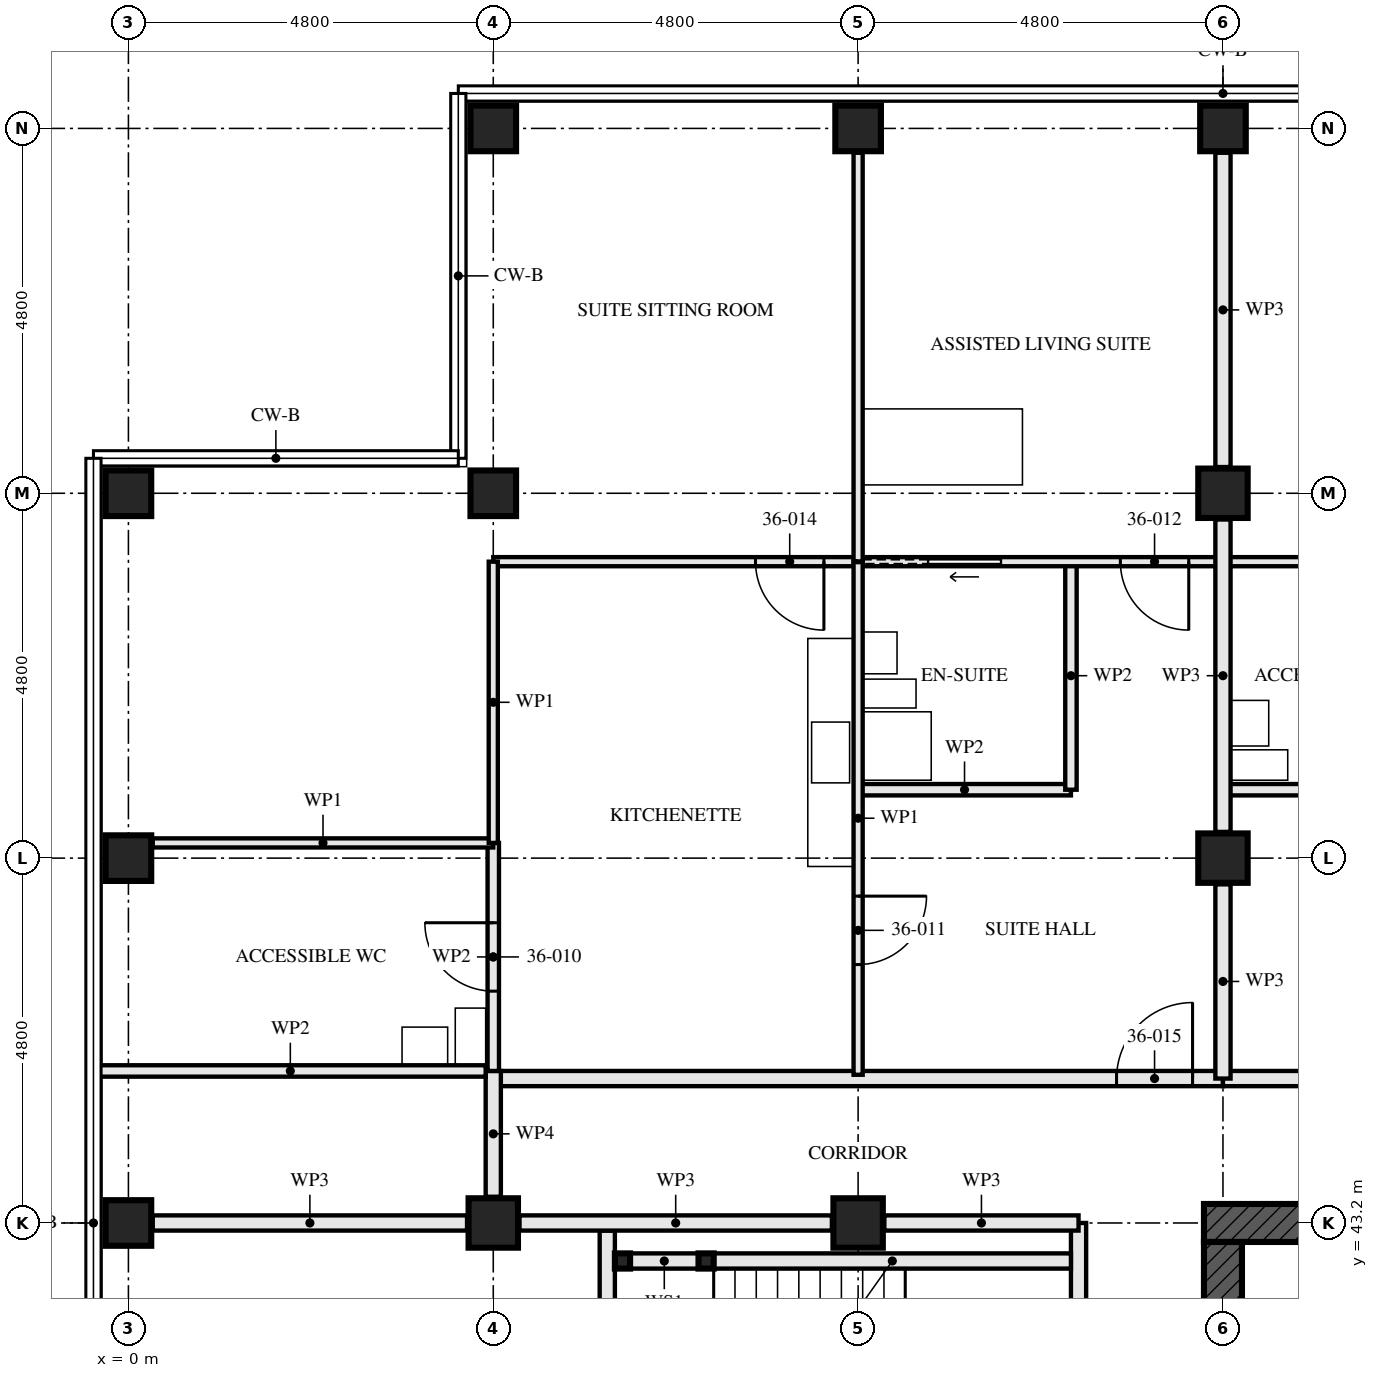
"""IFC4 building model, lengths in metres.
Left out: names, types, materials, properties, quantities, classifications, styles, units other than length and angle.
Written with IfcOpenShell. Run it as: python <this file> out.ifc"""

import sys

from ifc_helpers import new_model, si_unit, direction, frame, frame_2d, origin, origin_2d, place, context, subcontext, project, spatial, rectangle, hollow_rectangle, extrude, element, fill, save


model = new_model("IFC4")
c1 = context("Model", 3, precision=1e-05, world=origin(), true_north=direction((0.0, 1.0)))
c2 = subcontext(c1, "Body", "Model", "MODEL_VIEW")
j1 = project(units=[si_unit("LENGTHUNIT", "METRE"), si_unit("PLANEANGLEUNIT", "RADIAN")], contexts=[c1])
p1 = place(None, origin())
s1 = spatial("IfcSite", under=j1, at=p1, CompositionType="ELEMENT")
p2 = place(p1, origin())
s2 = spatial("IfcBuilding", under=s1, at=p2, CompositionType="ELEMENT")
p3 = place(p2, frame((0.0, 0.0, 133.0)))
s3 = spatial("IfcBuildingStorey", under=s2, at=p3, CompositionType="ELEMENT", Elevation=133.0)
for number, where, z_axis, x_axis in (
    (1, (0.0, 43.2, 0.0), (0.0, 0.0, 1.0), (0.0, 1.0, 0.0)),
    (2, (0.0, 48.0, 0.0), (0.0, 0.0, 1.0), (1.0, 0.0, 0.0)),
    (3, (0.0, 52.8, 0.0), (0.0, 0.0, 1.0), (0.0, 1.0, 0.0)),
):
    element("IfcColumn", number, at=place(p3, frame(where, z_axis=z_axis, x_axis=x_axis)), inside=s3, PredefinedType="COLUMN", context=c2, shape_type="SweptSolid", body=[
        extrude(hollow_rectangle(XDim=0.6, YDim=0.6, WallThickness=0.08, at=origin_2d()), origin(), (0.0, 0.0, 1.0), 3.5),
    ])
p4 = place(p3, frame((4.8, 43.2, 0.0), z_axis=(0.0, 0.0, 1.0), x_axis=(0.0, 1.0, 0.0)))
e4 = element("IfcColumn", 4, at=p4, inside=s3, PredefinedType="COLUMN", context=c2, shape_type="SweptSolid", body=[
    extrude(hollow_rectangle(XDim=0.65, YDim=0.65, WallThickness=0.05, at=origin_2d()), origin(), (0.0, 0.0, 1.0), 3.5),
])
for number, where, z_axis, x_axis in (
    (5, (4.8, 52.8, 0.0), (0.0, 0.0, 1.0), (0.0, 1.0, 0.0)),
    (6, (4.8, 57.6, 0.0), (0.0, 0.0, 1.0), (0.0, 1.0, 0.0)),
):
    element("IfcColumn", number, at=place(p3, frame(where, z_axis=z_axis, x_axis=x_axis)), inside=s3, PredefinedType="COLUMN", context=c2, shape_type="SweptSolid", body=[
        extrude(hollow_rectangle(XDim=0.6, YDim=0.6, WallThickness=0.08, at=origin_2d()), origin(), (0.0, 0.0, 1.0), 3.5),
    ])
p5 = place(p3, frame((9.6, 43.2, 0.0), z_axis=(0.0, 0.0, 1.0), x_axis=(0.0, 1.0, 0.0)))
e7 = element("IfcColumn", 7, at=p5, inside=s3, PredefinedType="COLUMN", context=c2, shape_type="SweptSolid", body=[
    extrude(hollow_rectangle(XDim=0.65, YDim=0.65, WallThickness=0.05, at=origin_2d()), origin(), (0.0, 0.0, 1.0), 3.5),
])
p6 = place(p3, frame((9.6, 57.6, 0.0), z_axis=(0.0, 0.0, 1.0), x_axis=(0.0, 1.0, 0.0)))
e8 = element("IfcColumn", 8, at=p6, inside=s3, PredefinedType="COLUMN", context=c2, shape_type="SweptSolid", body=[
    extrude(hollow_rectangle(XDim=0.6, YDim=0.6, WallThickness=0.08, at=origin_2d()), origin(), (0.0, 0.0, 1.0), 3.5),
])
for number, where, z_axis, x_axis in (
    (9, (14.4, 48.0, 0.0), (0.0, 0.0, 1.0), (1.0, 0.0, 0.0)),
    (10, (14.4, 52.8, 0.0), (0.0, 0.0, 1.0), (1.0, 0.0, 0.0)),
):
    element("IfcColumn", number, at=place(p3, frame(where, z_axis=z_axis, x_axis=x_axis)), inside=s3, PredefinedType="COLUMN", context=c2, shape_type="SweptSolid", body=[
        extrude(hollow_rectangle(XDim=0.65, YDim=0.65, WallThickness=0.05, at=origin_2d()), origin(), (0.0, 0.0, 1.0), 3.5),
    ])
p7 = place(p3, frame((14.4, 57.6, 0.0), z_axis=(0.0, 0.0, 1.0), x_axis=(0.0, 1.0, 0.0)))
e11 = element("IfcColumn", 11, at=p7, inside=s3, PredefinedType="COLUMN", context=c2, shape_type="SweptSolid", body=[
    extrude(hollow_rectangle(XDim=0.6, YDim=0.6, WallThickness=0.08, at=origin_2d()), origin(), (0.0, 0.0, 1.0), 3.5),
])
p8 = place(p3, frame((29.05, 43.2, -0.17), z_axis=(0.0, 0.0, 1.0), x_axis=(-1.0, 0.0, 0.0)))
e12 = element("IfcWall", 12, at=p8, inside=s3, PredefinedType="SHEAR", context=c2, shape_type="SweptSolid", body=[
    extrude(rectangle(XDim=14.9, YDim=0.5, at=frame_2d((7.45, 0.0))), origin(), (0.0, 0.0, 1.0), 3.42),
])
p9 = place(p8, frame((6.85, 0.0, 0.17)))
e13 = element("IfcOpeningElement", 13, at=p9, cuts=e12, PredefinedType="OPENING", context=c2, shape_type="SweptSolid", body=[
    extrude(rectangle(XDim=1.2, YDim=2.1, at=frame_2d((0.6, 1.05))), frame((0.0, 0.26, 0.0), z_axis=(0.0, -1.0, 0.0), x_axis=(1.0, 0.0, 0.0)), (0.0, 0.0, 1.0), 0.521),
])
p10 = place(p3, frame((14.4, 42.95, -0.17), z_axis=(0.0, 0.0, 1.0), x_axis=(0.0, -1.0, 0.0)))
e14 = element("IfcWall", 14, at=p10, inside=s3, PredefinedType="SHEAR", context=c2, shape_type="SweptSolid", body=[
    extrude(rectangle(XDim=13.9, YDim=0.5, at=frame_2d((6.95, 0.0))), origin(), (0.0, 0.0, 1.0), 3.42),
])
p11 = place(p10, frame((6.35, 0.0, 0.17)))
e15 = element("IfcOpeningElement", 15, at=p11, cuts=e14, PredefinedType="OPENING", context=c2, shape_type="SweptSolid", body=[
    extrude(rectangle(XDim=1.2, YDim=2.1, at=frame_2d((0.6, 1.05))), frame((0.0, 0.26, 0.0), z_axis=(0.0, -1.0, 0.0), x_axis=(1.0, 0.0, 0.0)), (0.0, 0.0, 1.0), 0.521),
])
for number, where, z_axis, x_axis in (
    (16, (6.5, 42.7, 0.0), (0.0, 0.0, 1.0), (1.0, 0.0, 0.0)),
    (17, (7.6, 42.7, 0.0), (0.0, 0.0, 1.0), (1.0, 0.0, 0.0)),
):
    element("IfcColumn", number, at=place(p3, frame(where, z_axis=z_axis, x_axis=x_axis)), inside=s3, PredefinedType="COLUMN", context=c2, shape_type="SweptSolid", body=[
        extrude(hollow_rectangle(XDim=0.2, YDim=0.2, WallThickness=0.008, at=origin_2d()), origin(), (0.0, 0.0, 1.0), 3.25),
    ])
p12 = place(p3, frame((6.6, 42.7, 0.0), z_axis=(0.0, 0.0, 1.0), x_axis=(1.0, 0.0, 0.0)))
e18 = element("IfcWall", 18, at=p12, inside=s3, PredefinedType="SOLIDWALL", context=c2, shape_type="SweptSolid", body=[
    extrude(rectangle(XDim=0.9, YDim=0.2, at=frame_2d((0.45, 0.0))), origin(), (0.0, 0.0, 1.0), 2.94),
])
p13 = place(p3, frame((7.7, 42.7, 0.0), z_axis=(0.0, 0.0, 1.0), x_axis=(1.0, 0.0, 0.0)))
e19 = element("IfcWall", 19, at=p13, inside=s3, PredefinedType="SOLIDWALL", context=c2, shape_type="SweptSolid", body=[
    extrude(rectangle(XDim=4.7, YDim=0.2, at=frame_2d((2.35, 0.0))), origin(), (0.0, 0.0, 1.0), 2.94),
])
p14 = place(p3, frame((6.3, 43.1, 0.0), z_axis=(0.0, 0.0, 1.0), x_axis=(0.0, -1.0, 0.0)))
e20 = element("IfcWall", 20, at=p14, inside=s3, PredefinedType="SOLIDWALL", context=c2, shape_type="SweptSolid", body=[
    extrude(rectangle(XDim=3.3, YDim=0.2, at=frame_2d((1.65, 0.0))), origin(), (0.0, 0.0, 1.0), 3.25),
])
p15 = place(p3, frame((12.5, 43.2, 0.0), z_axis=(0.0, 0.0, 1.0), x_axis=(0.0, -1.0, 0.0)))
e21 = element("IfcWall", 21, at=p15, inside=s3, PredefinedType="PARTITIONING", context=c2, shape_type="SweptSolid", body=[
    extrude(rectangle(XDim=14.84, YDim=0.2, at=frame_2d((7.42, 0.0))), origin(), (0.0, 0.0, 1.0), 2.04),
])
p16 = place(p15, frame((1.4, 0.0, 0.0)))
e22 = element("IfcOpeningElement", 22, at=p16, cuts=e21, PredefinedType="OPENING", context=c2, shape_type="SweptSolid", body=[
    extrude(rectangle(XDim=1.0, YDim=2.0, at=frame_2d((0.5, 1.0))), frame((0.0, 0.111, 0.0), z_axis=(0.0, -1.0, 0.0), x_axis=(1.0, 0.0, 0.0)), (0.0, 0.0, 1.0), 0.221),
])
p17 = place(p15, frame((5.2, 0.0, 0.0)))
e23 = element("IfcOpeningElement", 23, at=p17, cuts=e21, PredefinedType="OPENING", context=c2, shape_type="SweptSolid", body=[
    extrude(rectangle(XDim=1.0, YDim=2.0, at=frame_2d((0.5, 1.0))), frame((0.0, 0.111, 0.0), z_axis=(0.0, -1.0, 0.0), x_axis=(1.0, 0.0, 0.0)), (0.0, 0.0, 1.0), 0.221),
])
p18 = place(p15, frame((13.0, 0.0, 0.0)))
e24 = element("IfcOpeningElement", 24, at=p18, cuts=e21, PredefinedType="OPENING", context=c2, shape_type="SweptSolid", body=[
    extrude(rectangle(XDim=1.0, YDim=2.0, at=frame_2d((0.5, 1.0))), frame((0.0, 0.111, 0.0), z_axis=(0.0, -1.0, 0.0), x_axis=(1.0, 0.0, 0.0)), (0.0, 0.0, 1.0), 0.221),
])
p19 = place(p3, frame((12.4, 51.9, 0.0), z_axis=(0.0, 0.0, 1.0), x_axis=(0.0, -1.0, 0.0)))
e25 = element("IfcWall", 25, at=p19, inside=s3, PredefinedType="PARTITIONING", context=c2, shape_type="SweptSolid", body=[
    extrude(rectangle(XDim=3.0, YDim=0.15, at=frame_2d((1.5, 0.0))), origin(), (0.0, 0.0, 1.0), 3.25),
])
p20 = place(p3, frame((12.4, 48.9, 0.0), z_axis=(0.0, 0.0, 1.0), x_axis=(-1.0, 0.0, 0.0)))
e26 = element("IfcWall", 26, at=p20, inside=s3, PredefinedType="PARTITIONING", context=c2, shape_type="SweptSolid", body=[
    extrude(rectangle(XDim=2.8, YDim=0.15, at=frame_2d((1.4, 0.0))), origin(), (0.0, 0.0, 1.0), 3.25),
])
p21 = place(p3, frame((4.8, 48.2, 0.0), z_axis=(0.0, 0.0, 1.0), x_axis=(0.0, -1.0, 0.0)))
e27 = element("IfcWall", 27, at=p21, inside=s3, PredefinedType="PARTITIONING", context=c2, shape_type="SweptSolid", body=[
    extrude(rectangle(XDim=3.0, YDim=0.15, at=frame_2d((1.5, 0.0))), origin(), (0.0, 0.0, 1.0), 2.04),
])
p22 = place(p21, frame((1.05, 0.0, 0.0)))
e28 = element("IfcOpeningElement", 28, at=p22, cuts=e27, PredefinedType="OPENING", context=c2, shape_type="SweptSolid", body=[
    extrude(rectangle(XDim=0.9, YDim=2.0, at=frame_2d((0.45, 1.0))), frame((0.0, 0.085, 0.0), z_axis=(0.0, -1.0, 0.0), x_axis=(1.0, 0.0, 0.0)), (0.0, 0.0, 1.0), 0.171),
])
p23 = place(p3, frame((9.6, 51.9, 0.0), z_axis=(0.0, 0.0, 1.0), x_axis=(0.0, -1.0, 0.0)))
e29 = element("IfcWall", 29, at=p23, inside=s3, PredefinedType="PARTITIONING", context=c2, shape_type="SweptSolid", body=[
    extrude(rectangle(XDim=6.75, YDim=0.12, at=frame_2d((3.375, 0.0))), origin(), (0.0, 0.0, 1.0), 2.04),
])
p24 = place(p23, frame((4.4, 0.0, 0.0)))
e30 = element("IfcOpeningElement", 30, at=p24, cuts=e29, PredefinedType="OPENING", context=c2, shape_type="SweptSolid", body=[
    extrude(rectangle(XDim=0.9, YDim=2.0, at=frame_2d((0.45, 1.0))), frame((0.0, 0.071, 0.0), z_axis=(0.0, -1.0, 0.0), x_axis=(1.0, 0.0, 0.0)), (0.0, 0.0, 1.0), 0.141),
])
p25 = place(p3, frame((14.4, 51.9, 0.0), z_axis=(0.0, 0.0, 1.0), x_axis=(-1.0, 0.0, 0.0)))
e31 = element("IfcWall", 31, at=p25, inside=s3, PredefinedType="PARTITIONING", context=c2, shape_type="SweptSolid", body=[
    extrude(rectangle(XDim=4.8, YDim=0.12, at=frame_2d((2.4, 0.0))), origin(), (0.0, 0.0, 1.0), 3.25),
])
p26 = place(p25, frame((0.45, 0.0, 0.0)))
e32 = element("IfcOpeningElement", 32, at=p26, cuts=e31, PredefinedType="OPENING", context=c2, shape_type="SweptSolid", body=[
    extrude(rectangle(XDim=0.9, YDim=2.1, at=frame_2d((0.45, 1.05))), frame((0.0, 0.071, 0.0), z_axis=(0.0, -1.0, 0.0), x_axis=(1.0, 0.0, 0.0)), (0.0, 0.0, 1.0), 0.141),
])
p27 = place(p25, frame((2.925, 0.0, 0.0)))
e33 = element("IfcOpeningElement", 33, at=p27, cuts=e31, PredefinedType="OPENING", context=c2, shape_type="SweptSolid", body=[
    extrude(rectangle(XDim=0.95, YDim=2.1, at=frame_2d((0.475, 1.05))), frame((0.0, 0.071, 0.0), z_axis=(0.0, -1.0, 0.0), x_axis=(1.0, 0.0, 0.0)), (0.0, 0.0, 1.0), 0.141),
])
p28 = place(p3, frame((9.6, 51.9, 0.0), z_axis=(0.0, 0.0, 1.0), x_axis=(-1.0, 0.0, 0.0)))
e34 = element("IfcWall", 34, at=p28, inside=s3, PredefinedType="PARTITIONING", context=c2, shape_type="SweptSolid", body=[
    extrude(rectangle(XDim=4.8, YDim=0.12, at=frame_2d((2.4, 0.0))), origin(), (0.0, 0.0, 1.0), 3.25),
])
p29 = place(p28, frame((0.45, 0.0, 0.0)))
e35 = element("IfcOpeningElement", 35, at=p29, cuts=e34, PredefinedType="OPENING", context=c2, shape_type="SweptSolid", body=[
    extrude(rectangle(XDim=0.9, YDim=2.1, at=frame_2d((0.45, 1.05))), frame((0.0, 0.071, 0.0), z_axis=(0.0, -1.0, 0.0), x_axis=(1.0, 0.0, 0.0)), (0.0, 0.0, 1.0), 0.141),
])
p30 = place(p3, frame((4.8, 48.2, 0.0), z_axis=(0.0, 0.0, 1.0), x_axis=(-1.0, 0.0, 0.0)))
e36 = element("IfcWall", 36, at=p30, inside=s3, PredefinedType="PARTITIONING", context=c2, shape_type="SweptSolid", body=[
    extrude(rectangle(XDim=4.48, YDim=0.12, at=frame_2d((2.24, 0.0))), origin(), (0.0, 0.0, 1.0), 2.04),
])
p31 = place(p3, frame((9.6, 57.28, 0.0), z_axis=(0.0, 0.0, 1.0), x_axis=(0.0, -1.0, 0.0)))
e37 = element("IfcWall", 37, at=p31, inside=s3, PredefinedType="PARTITIONING", context=c2, shape_type="SweptSolid", body=[
    extrude(rectangle(XDim=5.38, YDim=0.12, at=frame_2d((2.69, 0.0))), origin(), (0.0, 0.0, 1.0), 2.24),
])
p32 = place(p3, frame((4.8, 51.9, 0.0), z_axis=(0.0, 0.0, 1.0), x_axis=(0.0, -1.0, 0.0)))
e38 = element("IfcWall", 38, at=p32, inside=s3, PredefinedType="PARTITIONING", context=c2, shape_type="SweptSolid", body=[
    extrude(rectangle(XDim=3.7, YDim=0.12, at=frame_2d((1.85, 0.0))), origin(), (0.0, 0.0, 1.0), 3.25),
])
p33 = place(p3, frame((14.4, 45.1, 0.0), z_axis=(0.0, 0.0, 1.0), x_axis=(-1.0, 0.0, 0.0)))
e39 = element("IfcWall", 39, at=p33, inside=s3, PredefinedType="PARTITIONING", context=c2, shape_type="SweptSolid", body=[
    extrude(rectangle(XDim=9.6, YDim=0.2, at=frame_2d((4.8, 0.0))), origin(), (0.0, 0.0, 1.0), 3.25),
])
p34 = place(p33, frame((0.4, 0.0, 0.0)))
e40 = element("IfcOpeningElement", 40, at=p34, cuts=e39, PredefinedType="OPENING", context=c2, shape_type="SweptSolid", body=[
    extrude(rectangle(XDim=1.0, YDim=2.1, at=frame_2d((0.5, 1.05))), frame((0.0, 0.111, 0.0), z_axis=(0.0, -1.0, 0.0), x_axis=(1.0, 0.0, 0.0)), (0.0, 0.0, 1.0), 0.221),
])
p35 = place(p3, frame((4.8, 45.2, 0.0), z_axis=(0.0, 0.0, 1.0), x_axis=(0.0, -1.0, 0.0)))
e41 = element("IfcWall", 41, at=p35, inside=s3, PredefinedType="PARTITIONING", context=c2, shape_type="SweptSolid", body=[
    extrude(rectangle(XDim=1.655, YDim=0.2, at=frame_2d((0.828, 0.0))), origin(), (0.0, 0.0, 1.0), 3.25),
])
p36 = place(p3, frame((17.2, 48.9, 0.0), z_axis=(0.0, 0.0, 1.0), x_axis=(-1.0, 0.0, 0.0)))
e42 = element("IfcWall", 42, at=p36, inside=s3, PredefinedType="PARTITIONING", context=c2, shape_type="SweptSolid", body=[
    extrude(rectangle(XDim=2.8, YDim=0.15, at=frame_2d((1.4, 0.0))), origin(), (0.0, 0.0, 1.0), 3.25),
])
p37 = place(p3, frame((19.2, 51.9, 0.0), z_axis=(0.0, 0.0, 1.0), x_axis=(-1.0, 0.0, 0.0)))
e43 = element("IfcWall", 43, at=p37, inside=s3, PredefinedType="PARTITIONING", context=c2, shape_type="SweptSolid", body=[
    extrude(rectangle(XDim=4.8, YDim=0.12, at=frame_2d((2.4, 0.0))), origin(), (0.0, 0.0, 1.0), 3.25),
])
p38 = place(p3, frame((29.24, 45.1, 0.0), z_axis=(0.0, 0.0, 1.0), x_axis=(-1.0, 0.0, 0.0)))
e44 = element("IfcWall", 44, at=p38, inside=s3, PredefinedType="PARTITIONING", context=c2, shape_type="SweptSolid", body=[
    extrude(rectangle(XDim=14.84, YDim=0.2, at=frame_2d((7.42, 0.0))), origin(), (0.0, 0.0, 1.0), 2.04),
])
p39 = place(p38, frame((5.64, 0.0, 0.0)))
e45 = element("IfcOpeningElement", 45, at=p39, cuts=e44, PredefinedType="OPENING", context=c2, shape_type="SweptSolid", body=[
    extrude(rectangle(XDim=1.0, YDim=2.0, at=frame_2d((0.5, 1.0))), frame((0.0, 0.111, 0.0), z_axis=(0.0, -1.0, 0.0), x_axis=(1.0, 0.0, 0.0)), (0.0, 0.0, 1.0), 0.221),
])
p40 = place(p3, frame((12.5, 43.2, 0.0), z_axis=(0.0, 0.0, 1.0), x_axis=(-1.0, 0.0, 0.0)))
e46 = element("IfcWall", 46, at=p40, inside=s3, PredefinedType="PARTITIONING", context=c2, shape_type="SweptSolid", body=[
    extrude(rectangle(XDim=2.555, YDim=0.2, at=frame_2d((1.277, 0.0))), origin(), (0.0, 0.0, 1.0), 2.04),
])
p41 = place(p3, frame((9.255, 43.2, 0.0), z_axis=(0.0, 0.0, 1.0), x_axis=(-1.0, 0.0, 0.0)))
e47 = element("IfcWall", 47, at=p41, inside=s3, PredefinedType="PARTITIONING", context=c2, shape_type="SweptSolid", body=[
    extrude(rectangle(XDim=4.11, YDim=0.2, at=frame_2d((2.055, 0.0))), origin(), (0.0, 0.0, 1.0), 2.04),
])
p42 = place(p3, frame((4.455, 43.2, 0.0), z_axis=(0.0, 0.0, 1.0), x_axis=(-1.0, 0.0, 0.0)))
e48 = element("IfcWall", 48, at=p42, inside=s3, PredefinedType="PARTITIONING", context=c2, shape_type="SweptSolid", body=[
    extrude(rectangle(XDim=4.135, YDim=0.2, at=frame_2d((2.067, 0.0))), origin(), (0.0, 0.0, 1.0), 2.04),
])
p43 = place(p3, frame((14.4, 45.1, 0.0), z_axis=(0.0, 0.0, 1.0), x_axis=(0.0, 1.0, 0.0)))
e49 = element("IfcWall", 49, at=p43, inside=s3, PredefinedType="PARTITIONING", context=c2, shape_type="SweptSolid", body=[
    extrude(rectangle(XDim=2.555, YDim=0.2, at=frame_2d((1.277, 0.0))), origin(), (0.0, 0.0, 1.0), 2.04),
])
p44 = place(p3, frame((14.4, 48.345, 0.0), z_axis=(0.0, 0.0, 1.0), x_axis=(0.0, 1.0, 0.0)))
e50 = element("IfcWall", 50, at=p44, inside=s3, PredefinedType="PARTITIONING", context=c2, shape_type="SweptSolid", body=[
    extrude(rectangle(XDim=4.11, YDim=0.2, at=frame_2d((2.055, 0.0))), origin(), (0.0, 0.0, 1.0), 2.04),
])
p45 = place(p3, frame((14.4, 53.145, 0.0), z_axis=(0.0, 0.0, 1.0), x_axis=(0.0, 1.0, 0.0)))
e51 = element("IfcWall", 51, at=p45, inside=s3, PredefinedType="PARTITIONING", context=c2, shape_type="SweptSolid", body=[
    extrude(rectangle(XDim=4.135, YDim=0.2, at=frame_2d((2.067, 0.0))), origin(), (0.0, 0.0, 1.0), 2.04),
])
p46 = place(p3, frame((4.7, 45.2, 0.0), z_axis=(0.0, 0.0, 1.0), x_axis=(-1.0, 0.0, 0.0)))
e52 = element("IfcWall", 52, at=p46, inside=s3, PredefinedType="PARTITIONING", context=c2, shape_type="SweptSolid", body=[
    extrude(rectangle(XDim=5.14, YDim=0.15, at=frame_2d((2.57, 0.0))), origin(), (0.0, 0.0, 1.0), 2.04),
])
p47 = place(p22, frame((0.9, 0.0, 0.0), z_axis=(0.0, 0.0, 1.0), x_axis=(-1.0, 0.0, 0.0)))
e53 = element("IfcDoor", 53, at=p47, inside=s3, OperationType="SINGLE_SWING_LEFT", PredefinedType="DOOR", context=c2, shape_type="SweptSolid", body=[
    extrude(rectangle(XDim=0.9, YDim=2.0, at=frame_2d((0.45, 1.0))), frame((0.0, 0.022, 0.0), z_axis=(0.0, -1.0, 0.0), x_axis=(1.0, 0.0, 0.0)), (0.0, 0.0, 1.0), 0.044),
])
fill(e28, e53)
p48 = place(p24, origin())
e54 = element("IfcDoor", 54, at=p48, inside=s3, OperationType="SINGLE_SWING_RIGHT", PredefinedType="DOOR", context=c2, shape_type="SweptSolid", body=[
    extrude(rectangle(XDim=0.9, YDim=2.0, at=frame_2d((0.45, 1.0))), frame((0.0, 0.022, 0.0), z_axis=(0.0, -1.0, 0.0), x_axis=(1.0, 0.0, 0.0)), (0.0, 0.0, 1.0), 0.044),
])
fill(e30, e54)
p49 = place(p26, origin())
e55 = element("IfcDoor", 55, at=p49, inside=s3, OperationType="SINGLE_SWING_RIGHT", PredefinedType="DOOR", context=c2, shape_type="SweptSolid", body=[
    extrude(rectangle(XDim=0.9, YDim=2.1, at=frame_2d((0.45, 1.05))), frame((0.0, 0.022, 0.0), z_axis=(0.0, -1.0, 0.0), x_axis=(1.0, 0.0, 0.0)), (0.0, 0.0, 1.0), 0.044),
])
fill(e32, e55)
p50 = place(p27, origin())
e56 = element("IfcDoor", 56, at=p50, inside=s3, OperationType="SLIDING_TO_LEFT", PredefinedType="DOOR", context=c2, shape_type="SweptSolid", body=[
    extrude(rectangle(XDim=0.95, YDim=2.1, at=frame_2d((0.475, 1.05))), frame((0.0, 0.022, 0.0), z_axis=(0.0, -1.0, 0.0), x_axis=(1.0, 0.0, 0.0)), (0.0, 0.0, 1.0), 0.044),
])
fill(e33, e56)
p51 = place(p29, origin())
e57 = element("IfcDoor", 57, at=p51, inside=s3, OperationType="SINGLE_SWING_RIGHT", PredefinedType="DOOR", context=c2, shape_type="SweptSolid", body=[
    extrude(rectangle(XDim=0.9, YDim=2.1, at=frame_2d((0.45, 1.05))), frame((0.0, 0.022, 0.0), z_axis=(0.0, -1.0, 0.0), x_axis=(1.0, 0.0, 0.0)), (0.0, 0.0, 1.0), 0.044),
])
fill(e35, e57)
p52 = place(p34, frame((1.0, 0.0, 0.0), z_axis=(0.0, 0.0, 1.0), x_axis=(-1.0, 0.0, 0.0)))
e58 = element("IfcDoor", 58, at=p52, inside=s3, OperationType="SINGLE_SWING_LEFT", PredefinedType="DOOR", context=c2, shape_type="SweptSolid", body=[
    extrude(rectangle(XDim=1.0, YDim=2.1, at=frame_2d((0.5, 1.05))), frame((0.0, 0.027, 0.0), z_axis=(0.0, -1.0, 0.0), x_axis=(1.0, 0.0, 0.0)), (0.0, 0.0, 1.0), 0.054),
])
fill(e40, e58)
save(model, sys.argv[1])
